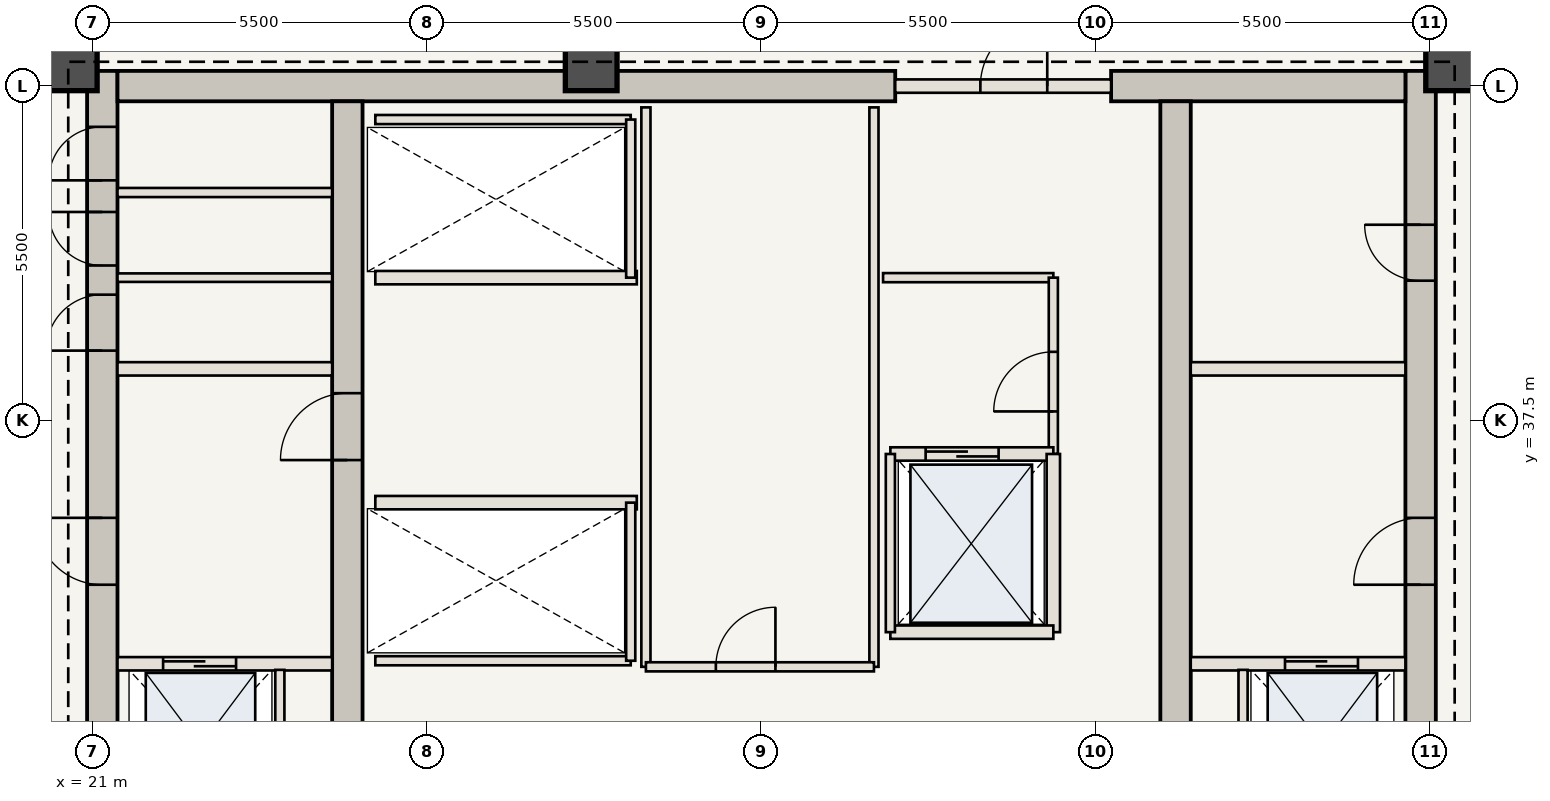
"""IFC4 building model, lengths in metres.
Left out: names, types, materials, properties, quantities, classifications, styles, units other than length and angle.
Written with IfcOpenShell. Run it as: python <this file> out.ifc"""

import sys

from ifc_helpers import new_model, si_unit, direction, frame, frame_2d, origin, origin_2d, place, context, subcontext, project, spatial, rectangle, extrude, element, fill, save


model = new_model("IFC4")
c1 = context("Model", 3, precision=1e-05, world=origin(), true_north=direction((0.0, 1.0)))
c2 = subcontext(c1, "Body", "Model", "MODEL_VIEW")
j1 = project(units=[si_unit("LENGTHUNIT", "METRE"), si_unit("PLANEANGLEUNIT", "RADIAN")], contexts=[c1])
p1 = place(None, origin())
s1 = spatial("IfcSite", under=j1, at=p1, CompositionType="ELEMENT")
p2 = place(p1, origin())
s2 = spatial("IfcBuilding", under=s1, at=p2, CompositionType="ELEMENT")
p3 = place(p2, frame((0.0, 0.0, 240.8)))
s3 = spatial("IfcBuildingStorey", under=s2, at=p3, CompositionType="ELEMENT", Elevation=240.8)
p4 = place(p3, frame((21.16, 30.6, 0.0), z_axis=(0.0, 0.0, 1.0), x_axis=(0.0, 1.0, 0.0)))
e1 = element("IfcWall", 1, at=p4, inside=s3, PredefinedType="SHEAR", context=c2, shape_type="SweptSolid", body=[
    extrude(rectangle(XDim=12.65, YDim=0.5, at=frame_2d((6.325, 0.0))), origin(), (0.0, 0.0, 1.0), 3.85),
])
p5 = place(p4, frame((4.2, 0.0, 0.0)))
e2 = element("IfcOpeningElement", 2, at=p5, cuts=e1, PredefinedType="OPENING", context=c2, shape_type="SweptSolid", body=[
    extrude(rectangle(XDim=1.1, YDim=2.15, at=frame_2d((0.55, 1.075))), frame((0.0, 0.26, 0.0), z_axis=(0.0, -1.0, 0.0), x_axis=(1.0, 0.0, 0.0)), (0.0, 0.0, 1.0), 0.52),
])
p6 = place(p4, frame((8.05, 0.0, 0.0)))
e3 = element("IfcOpeningElement", 3, at=p6, cuts=e1, PredefinedType="OPENING", context=c2, shape_type="SweptSolid", body=[
    extrude(rectangle(XDim=0.92, YDim=2.1, at=frame_2d((0.46, 1.05))), frame((0.0, 0.26, 0.0), z_axis=(0.0, -1.0, 0.0), x_axis=(1.0, 0.0, 0.0)), (0.0, 0.0, 1.0), 0.52),
])
p7 = place(p4, frame((9.45, 0.0, 0.0)))
e4 = element("IfcOpeningElement", 4, at=p7, cuts=e1, PredefinedType="OPENING", context=c2, shape_type="SweptSolid", body=[
    extrude(rectangle(XDim=0.88, YDim=2.1, at=frame_2d((0.44, 1.05))), frame((0.0, 0.26, 0.0), z_axis=(0.0, -1.0, 0.0), x_axis=(1.0, 0.0, 0.0)), (0.0, 0.0, 1.0), 0.52),
])
p8 = place(p4, frame((10.85, 0.0, 0.0)))
e5 = element("IfcOpeningElement", 5, at=p8, cuts=e1, PredefinedType="OPENING", context=c2, shape_type="SweptSolid", body=[
    extrude(rectangle(XDim=0.88, YDim=2.1, at=frame_2d((0.44, 1.05))), frame((0.0, 0.26, 0.0), z_axis=(0.0, -1.0, 0.0), x_axis=(1.0, 0.0, 0.0)), (0.0, 0.0, 1.0), 0.52),
])
p9 = place(p3, frame((42.84, 30.6, 0.0), z_axis=(0.0, 0.0, 1.0), x_axis=(0.0, 1.0, 0.0)))
e6 = element("IfcWall", 6, at=p9, inside=s3, PredefinedType="SHEAR", context=c2, shape_type="SweptSolid", body=[
    extrude(rectangle(XDim=12.65, YDim=0.5, at=frame_2d((6.325, 0.0))), origin(), (0.0, 0.0, 1.0), 3.85),
])
p10 = place(p9, frame((4.2, 0.0, 0.0)))
e7 = element("IfcOpeningElement", 7, at=p10, cuts=e6, PredefinedType="OPENING", context=c2, shape_type="SweptSolid", body=[
    extrude(rectangle(XDim=1.1, YDim=2.15, at=frame_2d((0.55, 1.075))), frame((0.0, 0.26, 0.0), z_axis=(0.0, -1.0, 0.0), x_axis=(1.0, 0.0, 0.0)), (0.0, 0.0, 1.0), 0.52),
])
p11 = place(p9, frame((9.2, 0.0, 0.0)))
e8 = element("IfcOpeningElement", 8, at=p11, cuts=e6, PredefinedType="OPENING", context=c2, shape_type="SweptSolid", body=[
    extrude(rectangle(XDim=0.92, YDim=2.1, at=frame_2d((0.46, 1.05))), frame((0.0, 0.26, 0.0), z_axis=(0.0, -1.0, 0.0), x_axis=(1.0, 0.0, 0.0)), (0.0, 0.0, 1.0), 0.52),
])
p12 = place(p3, frame((21.41, 43.0, 0.0), z_axis=(0.0, 0.0, 1.0), x_axis=(1.0, 0.0, 0.0)))
e9 = element("IfcWall", 9, at=p12, inside=s3, PredefinedType="SHEAR", context=c2, shape_type="SweptSolid", body=[
    extrude(rectangle(XDim=12.79, YDim=0.5, at=frame_2d((6.395, 0.0))), origin(), (0.0, 0.0, 1.0), 3.85),
])
p13 = place(p3, frame((37.75, 43.0, 0.0), z_axis=(0.0, 0.0, 1.0), x_axis=(1.0, 0.0, 0.0)))
e10 = element("IfcWall", 10, at=p13, inside=s3, PredefinedType="SHEAR", context=c2, shape_type="SweptSolid", body=[
    extrude(rectangle(XDim=4.84, YDim=0.5, at=frame_2d((2.42, 0.0))), origin(), (0.0, 0.0, 1.0), 3.85),
])
p14 = place(p3, frame((25.19, 30.6, 0.0), z_axis=(0.0, 0.0, 1.0), x_axis=(0.0, 1.0, 0.0)))
e11 = element("IfcWall", 11, at=p14, inside=s3, PredefinedType="SHEAR", context=c2, shape_type="SweptSolid", body=[
    extrude(rectangle(XDim=12.15, YDim=0.5, at=frame_2d((6.075, 0.0))), origin(), (0.0, 0.0, 1.0), 3.85),
])
p15 = place(p14, frame((6.25, 0.0, 0.0)))
e12 = element("IfcOpeningElement", 12, at=p15, cuts=e11, PredefinedType="OPENING", context=c2, shape_type="SweptSolid", body=[
    extrude(rectangle(XDim=1.1, YDim=2.15, at=frame_2d((0.55, 1.075))), frame((0.0, 0.26, 0.0), z_axis=(0.0, -1.0, 0.0), x_axis=(1.0, 0.0, 0.0)), (0.0, 0.0, 1.0), 0.52),
])
p16 = place(p3, frame((38.81, 30.6, 0.0), z_axis=(0.0, 0.0, 1.0), x_axis=(0.0, 1.0, 0.0)))
e13 = element("IfcWall", 13, at=p16, inside=s3, PredefinedType="SHEAR", context=c2, shape_type="SweptSolid", body=[
    extrude(rectangle(XDim=12.15, YDim=0.5, at=frame_2d((6.075, 0.0))), origin(), (0.0, 0.0, 1.0), 3.85),
])
for number, where, z_axis, x_axis in (
    (14, (43.35, 43.35, 0.0), (0.0, 0.0, 1.0), (1.0, 0.0, 0.0)),
    (15, (29.2, 43.35, 0.0), (0.0, 0.0, 1.0), (1.0, 0.0, 0.0)),
    (16, (20.65, 43.35, 0.0), (0.0, 0.0, 1.0), (1.0, 0.0, 0.0)),
):
    element("IfcColumn", number, at=place(p3, frame(where, z_axis=z_axis, x_axis=x_axis)), inside=s3, PredefinedType="COLUMN", context=c2, shape_type="SweptSolid", body=[
        extrude(rectangle(XDim=0.85, YDim=0.85, at=origin_2d()), origin(), (0.0, 0.0, 1.0), 3.85),
    ])
p17 = place(p3, frame((21.41, 33.5, 0.0), z_axis=(0.0, 0.0, 1.0), x_axis=(1.0, 0.0, 0.0)))
e17 = element("IfcWall", 17, at=p17, inside=s3, PredefinedType="STANDARD", context=c2, shape_type="SweptSolid", body=[
    extrude(rectangle(XDim=3.53, YDim=0.22, at=frame_2d((1.765, 0.0))), origin(), (0.0, 0.0, 1.0), 3.685),
])
p18 = place(p17, frame((0.75, 0.0, 0.0)))
e18 = element("IfcOpeningElement", 18, at=p18, cuts=e17, PredefinedType="OPENING", context=c2, shape_type="SweptSolid", body=[
    extrude(rectangle(XDim=1.2, YDim=2.2, at=frame_2d((0.6, 1.1))), frame((0.0, 0.12, 0.0), z_axis=(0.0, -1.0, 0.0), x_axis=(1.0, 0.0, 0.0)), (0.0, 0.0, 1.0), 0.24),
])
p19 = place(p3, frame((24.08, 30.75, 0.0), z_axis=(0.0, 0.0, 1.0), x_axis=(0.0, 1.0, 0.0)))
e19 = element("IfcWall", 19, at=p19, inside=s3, PredefinedType="STANDARD", context=c2, shape_type="SweptSolid", body=[
    extrude(rectangle(XDim=2.65, YDim=0.15, at=frame_2d((1.325, 0.0))), origin(), (0.0, 0.0, 1.0), 3.685),
])
p20 = place(p3, frame((39.06, 33.5, 0.0), z_axis=(0.0, 0.0, 1.0), x_axis=(1.0, 0.0, 0.0)))
e20 = element("IfcWall", 20, at=p20, inside=s3, PredefinedType="STANDARD", context=c2, shape_type="SweptSolid", body=[
    extrude(rectangle(XDim=3.53, YDim=0.22, at=frame_2d((1.765, 0.0))), origin(), (0.0, 0.0, 1.0), 3.685),
])
p21 = place(p20, frame((1.55, 0.0, 0.0)))
e21 = element("IfcOpeningElement", 21, at=p21, cuts=e20, PredefinedType="OPENING", context=c2, shape_type="SweptSolid", body=[
    extrude(rectangle(XDim=1.2, YDim=2.2, at=frame_2d((0.6, 1.1))), frame((0.0, 0.12, 0.0), z_axis=(0.0, -1.0, 0.0), x_axis=(1.0, 0.0, 0.0)), (0.0, 0.0, 1.0), 0.24),
])
p22 = place(p3, frame((39.92, 30.75, 0.0), z_axis=(0.0, 0.0, 1.0), x_axis=(0.0, 1.0, 0.0)))
e22 = element("IfcWall", 22, at=p22, inside=s3, PredefinedType="STANDARD", context=c2, shape_type="SweptSolid", body=[
    extrude(rectangle(XDim=2.65, YDim=0.15, at=frame_2d((1.325, 0.0))), origin(), (0.0, 0.0, 1.0), 3.685),
])
for number, where, z_axis, x_axis in (
    (23, (21.41, 38.35, 0.0), (0.0, 0.0, 1.0), (1.0, 0.0, 0.0)),
    (24, (39.06, 38.35, 0.0), (0.0, 0.0, 1.0), (1.0, 0.0, 0.0)),
):
    element("IfcWall", number, at=place(p3, frame(where, z_axis=z_axis, x_axis=x_axis)), inside=s3, PredefinedType="STANDARD", context=c2, shape_type="SweptSolid", body=[
        extrude(rectangle(XDim=3.53, YDim=0.22, at=frame_2d((1.765, 0.0))), origin(), (0.0, 0.0, 1.0), 3.685),
    ])
p23 = place(p3, frame((21.41, 39.85, 0.0), z_axis=(0.0, 0.0, 1.0), x_axis=(1.0, 0.0, 0.0)))
e25 = element("IfcWall", 25, at=p23, inside=s3, PredefinedType="STANDARD", context=c2, shape_type="SweptSolid", body=[
    extrude(rectangle(XDim=3.53, YDim=0.14, at=frame_2d((1.765, 0.0))), origin(), (0.0, 0.0, 1.0), 3.685),
])
p24 = place(p3, frame((21.41, 41.25, 0.0), z_axis=(0.0, 0.0, 1.0), x_axis=(1.0, 0.0, 0.0)))
e26 = element("IfcWall", 26, at=p24, inside=s3, PredefinedType="STANDARD", context=c2, shape_type="SweptSolid", body=[
    extrude(rectangle(XDim=3.53, YDim=0.15, at=frame_2d((1.765, 0.0))), origin(), (0.0, 0.0, 1.0), 3.685),
])
p25 = place(p3, frame((34.0, 39.85, 0.0), z_axis=(0.0, 0.0, 1.0), x_axis=(1.0, 0.0, 0.0)))
e27 = element("IfcWall", 27, at=p25, inside=s3, PredefinedType="STANDARD", context=c2, shape_type="SweptSolid", body=[
    extrude(rectangle(XDim=2.8, YDim=0.15, at=frame_2d((1.4, 0.0))), origin(), (0.0, 0.0, 1.0), 3.685),
])
p26 = place(p3, frame((36.8, 36.95, 0.0), z_axis=(0.0, 0.0, 1.0), x_axis=(0.0, 1.0, 0.0)))
e28 = element("IfcWall", 28, at=p26, inside=s3, PredefinedType="STANDARD", context=c2, shape_type="SweptSolid", body=[
    extrude(rectangle(XDim=2.9, YDim=0.15, at=frame_2d((1.45, 0.0))), origin(), (0.0, 0.0, 1.0), 3.685),
])
p27 = place(p26, frame((0.7, 0.0, 0.0)))
e29 = element("IfcOpeningElement", 29, at=p27, cuts=e28, PredefinedType="OPENING", context=c2, shape_type="SweptSolid", body=[
    extrude(rectangle(XDim=0.98, YDim=2.2, at=frame_2d((0.49, 1.1))), frame((0.0, 0.085, 0.0), z_axis=(0.0, -1.0, 0.0), x_axis=(1.0, 0.0, 0.0)), (0.0, 0.0, 1.0), 0.17),
])
p28 = place(p3, frame((25.65, 36.15, 0.0), z_axis=(0.0, 0.0, 1.0), x_axis=(1.0, 0.0, 0.0)))
e30 = element("IfcWall", 30, at=p28, inside=s3, PredefinedType="STANDARD", context=c2, shape_type="SweptSolid", body=[
    extrude(rectangle(XDim=4.3, YDim=0.22, at=frame_2d((2.15, 0.0))), origin(), (0.0, 0.0, 1.0), 3.685),
])
p29 = place(p3, frame((25.65, 33.55, 0.0), z_axis=(0.0, 0.0, 1.0), x_axis=(1.0, 0.0, 0.0)))
e31 = element("IfcWall", 31, at=p29, inside=s3, PredefinedType="STANDARD", context=c2, shape_type="SweptSolid", body=[
    extrude(rectangle(XDim=4.2, YDim=0.15, at=frame_2d((2.1, 0.0))), origin(), (0.0, 0.0, 1.0), 3.685),
])
p30 = place(p3, frame((29.85, 33.55, 0.0), z_axis=(0.0, 0.0, 1.0), x_axis=(0.0, 1.0, 0.0)))
e32 = element("IfcWall", 32, at=p30, inside=s3, PredefinedType="STANDARD", context=c2, shape_type="SweptSolid", body=[
    extrude(rectangle(XDim=2.6, YDim=0.15, at=frame_2d((1.3, 0.0))), origin(), (0.0, 0.0, 1.0), 3.685),
])
p31 = place(p3, frame((25.65, 39.85, 0.0), z_axis=(0.0, 0.0, 1.0), x_axis=(1.0, 0.0, 0.0)))
e33 = element("IfcWall", 33, at=p31, inside=s3, PredefinedType="STANDARD", context=c2, shape_type="SweptSolid", body=[
    extrude(rectangle(XDim=4.3, YDim=0.22, at=frame_2d((2.15, 0.0))), origin(), (0.0, 0.0, 1.0), 3.685),
])
p32 = place(p3, frame((25.65, 42.45, 0.0), z_axis=(0.0, 0.0, 1.0), x_axis=(1.0, 0.0, 0.0)))
e34 = element("IfcWall", 34, at=p32, inside=s3, PredefinedType="STANDARD", context=c2, shape_type="SweptSolid", body=[
    extrude(rectangle(XDim=4.2, YDim=0.15, at=frame_2d((2.1, 0.0))), origin(), (0.0, 0.0, 1.0), 3.685),
])
p33 = place(p3, frame((29.85, 39.85, 0.0), z_axis=(0.0, 0.0, 1.0), x_axis=(0.0, 1.0, 0.0)))
e35 = element("IfcWall", 35, at=p33, inside=s3, PredefinedType="STANDARD", context=c2, shape_type="SweptSolid", body=[
    extrude(rectangle(XDim=2.6, YDim=0.15, at=frame_2d((1.3, 0.0))), origin(), (0.0, 0.0, 1.0), 3.685),
])
for number, where, z_axis, x_axis in (
    (36, (30.1, 33.45, 0.0), (0.0, 0.0, 1.0), (0.0, 1.0, 0.0)),
    (37, (33.85, 33.45, 0.0), (0.0, 0.0, 1.0), (0.0, 1.0, 0.0)),
):
    element("IfcWall", number, at=place(p3, frame(where, z_axis=z_axis, x_axis=x_axis)), inside=s3, PredefinedType="STANDARD", context=c2, shape_type="SweptSolid", body=[
        extrude(rectangle(XDim=9.2, YDim=0.15, at=frame_2d((4.6, 0.0))), origin(), (0.0, 0.0, 1.0), 3.685),
    ])
p34 = place(p3, frame((30.1, 33.45, 0.0), z_axis=(0.0, 0.0, 1.0), x_axis=(1.0, 0.0, 0.0)))
e38 = element("IfcWall", 38, at=p34, inside=s3, PredefinedType="STANDARD", context=c2, shape_type="SweptSolid", body=[
    extrude(rectangle(XDim=3.75, YDim=0.15, at=frame_2d((1.875, 0.0))), origin(), (0.0, 0.0, 1.0), 3.685),
])
p35 = place(p34, frame((1.15, 0.0, 0.0)))
e39 = element("IfcOpeningElement", 39, at=p35, cuts=e38, PredefinedType="OPENING", context=c2, shape_type="SweptSolid", body=[
    extrude(rectangle(XDim=0.98, YDim=2.2, at=frame_2d((0.49, 1.1))), frame((0.0, 0.085, 0.0), z_axis=(0.0, -1.0, 0.0), x_axis=(1.0, 0.0, 0.0)), (0.0, 0.0, 1.0), 0.17),
])
p36 = place(p3, frame((34.2, 43.0, 0.0), z_axis=(0.0, 0.0, 1.0), x_axis=(1.0, 0.0, 0.0)))
e40 = element("IfcWall", 40, at=p36, inside=s3, PredefinedType="STANDARD", context=c2, shape_type="SweptSolid", body=[
    extrude(rectangle(XDim=3.55, YDim=0.22, at=frame_2d((1.775, 0.0))), origin(), (0.0, 0.0, 1.0), 3.685),
])
p37 = place(p36, frame((1.4, 0.0, 0.0)))
e41 = element("IfcOpeningElement", 41, at=p37, cuts=e40, PredefinedType="OPENING", context=c2, shape_type="SweptSolid", body=[
    extrude(rectangle(XDim=1.1, YDim=2.15, at=frame_2d((0.55, 1.075))), frame((0.0, 0.12, 0.0), z_axis=(0.0, -1.0, 0.0), x_axis=(1.0, 0.0, 0.0)), (0.0, 0.0, 1.0), 0.24),
])
p38 = place(p3, frame((34.12, 36.95, 0.0), z_axis=(0.0, 0.0, 1.0), x_axis=(1.0, 0.0, 0.0)))
e42 = element("IfcWall", 42, at=p38, inside=s3, PredefinedType="STANDARD", context=c2, shape_type="SweptSolid", body=[
    extrude(rectangle(XDim=2.68, YDim=0.22, at=frame_2d((1.34, 0.0))), origin(), (0.0, 0.0, 1.0), 3.685),
])
p39 = place(p38, frame((0.58, 0.0, 0.0)))
e43 = element("IfcOpeningElement", 43, at=p39, cuts=e42, PredefinedType="OPENING", context=c2, shape_type="SweptSolid", body=[
    extrude(rectangle(XDim=1.2, YDim=2.2, at=frame_2d((0.6, 1.1))), frame((0.0, 0.12, 0.0), z_axis=(0.0, -1.0, 0.0), x_axis=(1.0, 0.0, 0.0)), (0.0, 0.0, 1.0), 0.24),
])
p40 = place(p3, frame((36.8, 34.02, 0.0), z_axis=(0.0, 0.0, 1.0), x_axis=(0.0, 1.0, 0.0)))
e44 = element("IfcWall", 44, at=p40, inside=s3, PredefinedType="STANDARD", context=c2, shape_type="SweptSolid", body=[
    extrude(rectangle(XDim=2.93, YDim=0.22, at=frame_2d((1.465, 0.0))), origin(), (0.0, 0.0, 1.0), 3.685),
])
p41 = place(p3, frame((34.12, 34.02, 0.0), z_axis=(0.0, 0.0, 1.0), x_axis=(1.0, 0.0, 0.0)))
e45 = element("IfcWall", 45, at=p41, inside=s3, PredefinedType="STANDARD", context=c2, shape_type="SweptSolid", body=[
    extrude(rectangle(XDim=2.68, YDim=0.22, at=frame_2d((1.34, 0.0))), origin(), (0.0, 0.0, 1.0), 3.685),
])
p42 = place(p3, frame((34.12, 34.02, 0.0), z_axis=(0.0, 0.0, 1.0), x_axis=(0.0, 1.0, 0.0)))
e46 = element("IfcWall", 46, at=p42, inside=s3, PredefinedType="STANDARD", context=c2, shape_type="SweptSolid", body=[
    extrude(rectangle(XDim=2.93, YDim=0.15, at=frame_2d((1.465, 0.0))), origin(), (0.0, 0.0, 1.0), 3.685),
])
p43 = place(p5, origin())
e47 = element("IfcDoor", 47, at=p43, inside=s3, OperationType="SINGLE_SWING_RIGHT", PredefinedType="DOOR", context=c2, shape_type="SweptSolid", body=[
    extrude(rectangle(XDim=1.1, YDim=2.15, at=frame_2d((0.55, 1.075))), frame((0.0, 0.025, 0.0), z_axis=(0.0, -1.0, 0.0), x_axis=(1.0, 0.0, 0.0)), (0.0, 0.0, 1.0), 0.05),
])
fill(e2, e47)
p44 = place(p10, origin())
e48 = element("IfcDoor", 48, at=p44, inside=s3, OperationType="SINGLE_SWING_LEFT", PredefinedType="DOOR", context=c2, shape_type="SweptSolid", body=[
    extrude(rectangle(XDim=1.1, YDim=2.15, at=frame_2d((0.55, 1.075))), frame((0.0, 0.025, 0.0), z_axis=(0.0, -1.0, 0.0), x_axis=(1.0, 0.0, 0.0)), (0.0, 0.0, 1.0), 0.05),
])
fill(e7, e48)
p45 = place(p15, origin())
e49 = element("IfcDoor", 49, at=p45, inside=s3, OperationType="SINGLE_SWING_LEFT", PredefinedType="DOOR", context=c2, shape_type="SweptSolid", body=[
    extrude(rectangle(XDim=1.1, YDim=2.15, at=frame_2d((0.55, 1.075))), frame((0.0, 0.025, 0.0), z_axis=(0.0, -1.0, 0.0), x_axis=(1.0, 0.0, 0.0)), (0.0, 0.0, 1.0), 0.05),
])
fill(e12, e49)
p46 = place(p6, origin())
e50 = element("IfcDoor", 50, at=p46, inside=s3, OperationType="SINGLE_SWING_LEFT", PredefinedType="DOOR", context=c2, shape_type="SweptSolid", body=[
    extrude(rectangle(XDim=0.92, YDim=2.1, at=frame_2d((0.46, 1.05))), frame((0.0, 0.025, 0.0), z_axis=(0.0, -1.0, 0.0), x_axis=(1.0, 0.0, 0.0)), (0.0, 0.0, 1.0), 0.05),
])
fill(e3, e50)
p47 = place(p7, origin())
e51 = element("IfcDoor", 51, at=p47, inside=s3, OperationType="SINGLE_SWING_RIGHT", PredefinedType="DOOR", context=c2, shape_type="SweptSolid", body=[
    extrude(rectangle(XDim=0.88, YDim=2.1, at=frame_2d((0.44, 1.05))), frame((0.0, 0.025, 0.0), z_axis=(0.0, -1.0, 0.0), x_axis=(1.0, 0.0, 0.0)), (0.0, 0.0, 1.0), 0.05),
])
fill(e4, e51)
p48 = place(p8, origin())
e52 = element("IfcDoor", 52, at=p48, inside=s3, OperationType="SINGLE_SWING_LEFT", PredefinedType="DOOR", context=c2, shape_type="SweptSolid", body=[
    extrude(rectangle(XDim=0.88, YDim=2.1, at=frame_2d((0.44, 1.05))), frame((0.0, 0.025, 0.0), z_axis=(0.0, -1.0, 0.0), x_axis=(1.0, 0.0, 0.0)), (0.0, 0.0, 1.0), 0.05),
])
fill(e5, e52)
p49 = place(p11, origin())
e53 = element("IfcDoor", 53, at=p49, inside=s3, OperationType="SINGLE_SWING_RIGHT", PredefinedType="DOOR", context=c2, shape_type="SweptSolid", body=[
    extrude(rectangle(XDim=0.92, YDim=2.1, at=frame_2d((0.46, 1.05))), frame((0.0, 0.025, 0.0), z_axis=(0.0, -1.0, 0.0), x_axis=(1.0, 0.0, 0.0)), (0.0, 0.0, 1.0), 0.05),
])
fill(e8, e53)
p50 = place(p18, origin())
e54 = element("IfcDoor", 54, at=p50, inside=s3, OperationType="DOUBLE_DOOR_SLIDING", PredefinedType="DOOR", context=c2, shape_type="SweptSolid", body=[
    extrude(rectangle(XDim=1.2, YDim=2.2, at=frame_2d((0.6, 1.1))), frame((0.0, 0.025, 0.0), z_axis=(0.0, -1.0, 0.0), x_axis=(1.0, 0.0, 0.0)), (0.0, 0.0, 1.0), 0.05),
])
fill(e18, e54)
p51 = place(p21, origin())
e55 = element("IfcDoor", 55, at=p51, inside=s3, OperationType="DOUBLE_DOOR_SLIDING", PredefinedType="DOOR", context=c2, shape_type="SweptSolid", body=[
    extrude(rectangle(XDim=1.2, YDim=2.2, at=frame_2d((0.6, 1.1))), frame((0.0, 0.025, 0.0), z_axis=(0.0, -1.0, 0.0), x_axis=(1.0, 0.0, 0.0)), (0.0, 0.0, 1.0), 0.05),
])
fill(e21, e55)
p52 = place(p27, origin())
e56 = element("IfcDoor", 56, at=p52, inside=s3, OperationType="SINGLE_SWING_LEFT", PredefinedType="DOOR", context=c2, shape_type="SweptSolid", body=[
    extrude(rectangle(XDim=0.98, YDim=2.2, at=frame_2d((0.49, 1.1))), frame((0.0, 0.025, 0.0), z_axis=(0.0, -1.0, 0.0), x_axis=(1.0, 0.0, 0.0)), (0.0, 0.0, 1.0), 0.05),
])
fill(e29, e56)
p53 = place(p35, origin())
e57 = element("IfcDoor", 57, at=p53, inside=s3, OperationType="SINGLE_SWING_RIGHT", PredefinedType="DOOR", context=c2, shape_type="SweptSolid", body=[
    extrude(rectangle(XDim=0.98, YDim=2.2, at=frame_2d((0.49, 1.1))), frame((0.0, 0.025, 0.0), z_axis=(0.0, -1.0, 0.0), x_axis=(1.0, 0.0, 0.0)), (0.0, 0.0, 1.0), 0.05),
])
fill(e39, e57)
p54 = place(p37, origin())
e58 = element("IfcDoor", 58, at=p54, inside=s3, OperationType="SINGLE_SWING_RIGHT", PredefinedType="DOOR", context=c2, shape_type="SweptSolid", body=[
    extrude(rectangle(XDim=1.1, YDim=2.15, at=frame_2d((0.55, 1.075))), frame((0.0, 0.025, 0.0), z_axis=(0.0, -1.0, 0.0), x_axis=(1.0, 0.0, 0.0)), (0.0, 0.0, 1.0), 0.05),
])
fill(e41, e58)
p55 = place(p39, origin())
e59 = element("IfcDoor", 59, at=p55, inside=s3, OperationType="DOUBLE_DOOR_SLIDING", PredefinedType="DOOR", context=c2, shape_type="SweptSolid", body=[
    extrude(rectangle(XDim=1.2, YDim=2.2, at=frame_2d((0.6, 1.1))), frame((0.0, 0.025, 0.0), z_axis=(0.0, -1.0, 0.0), x_axis=(1.0, 0.0, 0.0)), (0.0, 0.0, 1.0), 0.05),
])
fill(e43, e59)
save(model, sys.argv[1])
